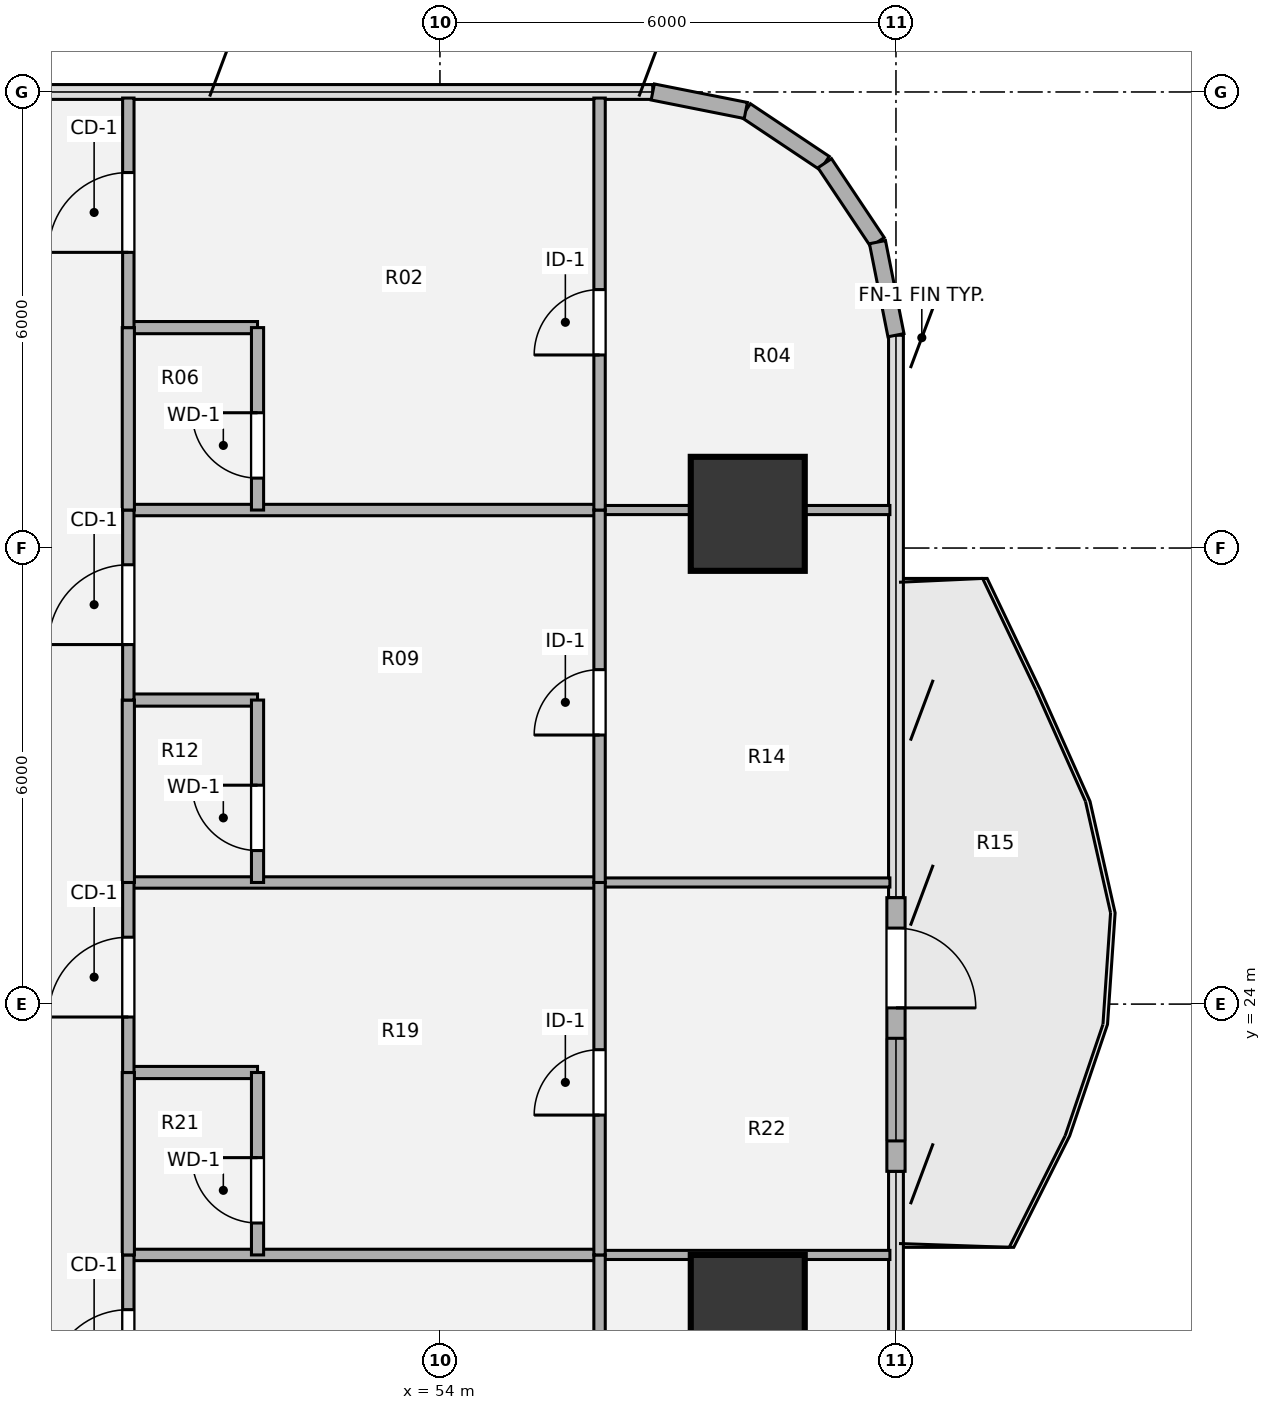
"""IFC4 building model, lengths in metres.
Left out: names, types, materials, properties, quantities, classifications, styles, units other than length and angle.
Written with IfcOpenShell. Run it as: python <this file> out.ifc"""

import sys

from ifc_helpers import new_model, si_unit, direction, frame, frame_2d, origin, origin_2d, place, context, subcontext, project, spatial, rectangle, hollow_circle, extrude, source, transform, mapped, element, fill, save


model = new_model("IFC4")
c1 = context("Model", 3, precision=1e-05, world=origin(), true_north=direction((0.0, 1.0)))
c2 = subcontext(c1, "Body", "Model", "MODEL_VIEW")
j1 = project(units=[si_unit("LENGTHUNIT", "METRE"), si_unit("PLANEANGLEUNIT", "RADIAN")], contexts=[c1])
p1 = place(None, origin())
s1 = spatial("IfcSite", under=j1, at=p1, CompositionType="ELEMENT")
p2 = place(p1, origin())
s2 = spatial("IfcBuilding", under=s1, at=p2, CompositionType="ELEMENT")
p3 = place(p2, frame((0.0, 0.0, 64.8)))
s3 = spatial("IfcBuildingStorey", under=s2, at=p3, CompositionType="ELEMENT", Elevation=64.8)
m1 = source(origin(), c2, "Body", "SweptSolid", [
    extrude(hollow_circle(Radius=0.75, WallThickness=0.05, at=origin_2d()), origin(), (0.0, 0.0, 1.0), 3.78),
])
for number, where, z_axis, x_axis in (
    (1, (58.05, 19.95, 0.0), (0.0, 0.0, 1.0), (1.0, 0.0, 0.0)),
    (2, (58.05, 30.45, 0.0), (0.0, 0.0, 1.0), (1.0, 0.0, 0.0)),
):
    element("IfcColumn", number, at=place(p3, frame(where, z_axis=z_axis, x_axis=x_axis)), inside=s3, PredefinedType="COLUMN", context=c2, shape_type="MappedRepresentation", body=[
        mapped(m1, transform((0.0, 0.0, 0.0), x_axis=(1.0, 0.0, 0.0), y_axis=(0.0, 1.0, 0.0), z_axis=(0.0, 0.0, 1.0), scale=1.0)),
    ])
for number, where, z_axis, x_axis in (
    (3, (58.025, 35.756, 0.0), (0.0, 0.0, 1.0), (0.831, -0.556, 0.0)),
    (4, (59.063, 35.063, 0.0), (0.0, 0.0, 1.0), (0.556, -0.831, 0.0)),
    (5, (59.756, 34.025, 0.0), (0.0, 0.0, 1.0), (0.195, -0.981, 0.0)),
):
    element("IfcWall", number, at=place(p3, frame(where, z_axis=z_axis, x_axis=x_axis)), inside=s3, PredefinedType="SOLIDWALL", context=c2, shape_type="SweptSolid", body=[
        extrude(rectangle(XDim=1.249, YDim=0.215, at=frame_2d((0.624, 0.0))), origin(), (0.0, 0.0, 1.0), 3.53),
    ])
p4 = place(p3, frame((60.0, 25.4, 0.0), z_axis=(0.0, 0.0, 1.0), x_axis=(0.0, -1.0, 0.0)))
e6 = element("IfcWall", 6, at=p4, inside=s3, PredefinedType="SOLIDWALL", context=c2, shape_type="SweptSolid", body=[
    extrude(rectangle(XDim=3.6, YDim=0.24, at=frame_2d((1.8, 0.0))), origin(), (0.0, 0.0, 1.0), 3.53),
])
p5 = place(p4, frame((0.4, 0.0, 0.0)))
e7 = element("IfcOpeningElement", 7, at=p5, cuts=e6, PredefinedType="OPENING", context=c2, shape_type="SweptSolid", body=[
    extrude(rectangle(XDim=1.05, YDim=2.15, at=origin_2d()), frame((0.525, 0.13, 1.075), z_axis=(0.0, -1.0, 0.0), x_axis=(1.0, 0.0, 0.0)), (0.0, 0.0, 1.0), 0.26),
])
p6 = place(p4, frame((1.85, 0.0, 0.85)))
e8 = element("IfcOpeningElement", 8, at=p6, cuts=e6, PredefinedType="OPENING", context=c2, shape_type="SweptSolid", body=[
    extrude(rectangle(XDim=1.35, YDim=1.35, at=origin_2d()), frame((0.675, 0.13, 0.675), z_axis=(0.0, -1.0, 0.0), x_axis=(1.0, 0.0, 0.0)), (0.0, 0.0, 1.0), 0.26),
])
p7 = place(p3, frame((56.8, 36.0, 0.0), z_axis=(0.0, 0.0, 1.0), x_axis=(0.980775717779, -0.195138390419, 0.0)))
e9 = element("IfcWall", 9, at=p7, inside=s3, PredefinedType="SOLIDWALL", context=c2, shape_type="SweptSolid", body=[
    extrude(rectangle(XDim=1.249, YDim=0.215, at=frame_2d((0.624, 0.0))), origin(), (0.0, 0.0, 1.0), 3.53),
])
p8 = place(p3, frame((49.9, 20.7, 0.0), z_axis=(0.0, 0.0, 1.0), x_axis=(1.0, 0.0, 0.0)))
e10 = element("IfcWall", 10, at=p8, inside=s3, PredefinedType="PARTITIONING", context=c2, shape_type="SweptSolid", body=[
    extrude(rectangle(XDim=6.2, YDim=0.15, at=frame_2d((3.1, 0.0))), origin(), (0.0, 0.0, 1.0), 2.982),
])
p9 = place(p3, frame((56.1, 20.7, 0.0), z_axis=(0.0, 0.0, 1.0), x_axis=(1.0, 0.0, 0.0)))
e11 = element("IfcWall", 11, at=p9, inside=s3, PredefinedType="PARTITIONING", context=c2, shape_type="SweptSolid", body=[
    extrude(rectangle(XDim=3.82, YDim=0.12, at=frame_2d((1.91, 0.0))), origin(), (0.0, 0.0, 1.0), 2.982),
])
p10 = place(p3, frame((49.9, 23.1, 0.0), z_axis=(0.0, 0.0, 1.0), x_axis=(1.0, 0.0, 0.0)))
e12 = element("IfcWall", 12, at=p10, inside=s3, PredefinedType="PLUMBINGWALL", context=c2, shape_type="SweptSolid", body=[
    extrude(rectangle(XDim=1.7, YDim=0.16, at=frame_2d((0.85, 0.0))), origin(), (0.0, 0.0, 1.0), 3.055),
])
p11 = place(p3, frame((49.9, 25.6, 0.0), z_axis=(0.0, 0.0, 1.0), x_axis=(1.0, 0.0, 0.0)))
e13 = element("IfcWall", 13, at=p11, inside=s3, PredefinedType="PARTITIONING", context=c2, shape_type="SweptSolid", body=[
    extrude(rectangle(XDim=6.2, YDim=0.15, at=frame_2d((3.1, 0.0))), origin(), (0.0, 0.0, 1.0), 2.982),
])
p12 = place(p3, frame((56.1, 25.6, 0.0), z_axis=(0.0, 0.0, 1.0), x_axis=(1.0, 0.0, 0.0)))
e14 = element("IfcWall", 14, at=p12, inside=s3, PredefinedType="PARTITIONING", context=c2, shape_type="SweptSolid", body=[
    extrude(rectangle(XDim=3.82, YDim=0.12, at=frame_2d((1.91, 0.0))), origin(), (0.0, 0.0, 1.0), 2.982),
])
p13 = place(p3, frame((49.9, 28.0, 0.0), z_axis=(0.0, 0.0, 1.0), x_axis=(1.0, 0.0, 0.0)))
e15 = element("IfcWall", 15, at=p13, inside=s3, PredefinedType="PLUMBINGWALL", context=c2, shape_type="SweptSolid", body=[
    extrude(rectangle(XDim=1.7, YDim=0.16, at=frame_2d((0.85, 0.0))), origin(), (0.0, 0.0, 1.0), 2.982),
])
p14 = place(p3, frame((49.9, 30.5, 0.0), z_axis=(0.0, 0.0, 1.0), x_axis=(1.0, 0.0, 0.0)))
e16 = element("IfcWall", 16, at=p14, inside=s3, PredefinedType="PARTITIONING", context=c2, shape_type="SweptSolid", body=[
    extrude(rectangle(XDim=6.2, YDim=0.15, at=frame_2d((3.1, 0.0))), origin(), (0.0, 0.0, 1.0), 2.903),
])
p15 = place(p3, frame((56.1, 30.5, 0.0), z_axis=(0.0, 0.0, 1.0), x_axis=(1.0, 0.0, 0.0)))
e17 = element("IfcWall", 17, at=p15, inside=s3, PredefinedType="PARTITIONING", context=c2, shape_type="SweptSolid", body=[
    extrude(rectangle(XDim=3.82, YDim=0.12, at=frame_2d((1.91, 0.0))), origin(), (0.0, 0.0, 1.0), 2.903),
])
p16 = place(p3, frame((49.9, 32.9, 0.0), z_axis=(0.0, 0.0, 1.0), x_axis=(1.0, 0.0, 0.0)))
e18 = element("IfcWall", 18, at=p16, inside=s3, PredefinedType="PLUMBINGWALL", context=c2, shape_type="SweptSolid", body=[
    extrude(rectangle(XDim=1.7, YDim=0.16, at=frame_2d((0.85, 0.0))), origin(), (0.0, 0.0, 1.0), 3.055),
])
p17 = place(p3, frame((49.9, 18.2, 0.0), z_axis=(0.0, 0.0, 1.0), x_axis=(0.0, 1.0, 0.0)))
e19 = element("IfcWall", 19, at=p17, inside=s3, PredefinedType="PARTITIONING", context=c2, shape_type="SweptSolid", body=[
    extrude(rectangle(XDim=2.5, YDim=0.15, at=frame_2d((1.25, 0.0))), origin(), (0.0, 0.0, 1.0), 3.5),
])
p18 = place(p17, frame((0.73, 0.0, 0.0)))
e20 = element("IfcOpeningElement", 20, at=p18, cuts=e19, PredefinedType="OPENING", context=c2, shape_type="SweptSolid", body=[
    extrude(rectangle(XDim=1.05, YDim=2.1, at=origin_2d()), frame((0.525, 0.085, 1.05), z_axis=(0.0, -1.0, 0.0), x_axis=(1.0, 0.0, 0.0)), (0.0, 0.0, 1.0), 0.17),
])
p19 = place(p3, frame((49.9, 20.7, 0.0), z_axis=(0.0, 0.0, 1.0), x_axis=(0.0, 1.0, 0.0)))
e21 = element("IfcWall", 21, at=p19, inside=s3, PredefinedType="PLUMBINGWALL", context=c2, shape_type="SweptSolid", body=[
    extrude(rectangle(XDim=2.4, YDim=0.16, at=frame_2d((1.2, 0.0))), origin(), (0.0, 0.0, 1.0), 3.5),
])
p20 = place(p3, frame((49.9, 23.1, 0.0), z_axis=(0.0, 0.0, 1.0), x_axis=(0.0, 1.0, 0.0)))
e22 = element("IfcWall", 22, at=p20, inside=s3, PredefinedType="PARTITIONING", context=c2, shape_type="SweptSolid", body=[
    extrude(rectangle(XDim=2.5, YDim=0.15, at=frame_2d((1.25, 0.0))), origin(), (0.0, 0.0, 1.0), 3.5),
])
p21 = place(p20, frame((0.73, 0.0, 0.0)))
e23 = element("IfcOpeningElement", 23, at=p21, cuts=e22, PredefinedType="OPENING", context=c2, shape_type="SweptSolid", body=[
    extrude(rectangle(XDim=1.05, YDim=2.1, at=origin_2d()), frame((0.525, 0.085, 1.05), z_axis=(0.0, -1.0, 0.0), x_axis=(1.0, 0.0, 0.0)), (0.0, 0.0, 1.0), 0.17),
])
p22 = place(p3, frame((49.9, 25.6, 0.0), z_axis=(0.0, 0.0, 1.0), x_axis=(0.0, 1.0, 0.0)))
e24 = element("IfcWall", 24, at=p22, inside=s3, PredefinedType="PLUMBINGWALL", context=c2, shape_type="SweptSolid", body=[
    extrude(rectangle(XDim=2.4, YDim=0.16, at=frame_2d((1.2, 0.0))), origin(), (0.0, 0.0, 1.0), 3.5),
])
p23 = place(p3, frame((49.9, 28.0, 0.0), z_axis=(0.0, 0.0, 1.0), x_axis=(0.0, 1.0, 0.0)))
e25 = element("IfcWall", 25, at=p23, inside=s3, PredefinedType="PARTITIONING", context=c2, shape_type="SweptSolid", body=[
    extrude(rectangle(XDim=2.5, YDim=0.15, at=frame_2d((1.25, 0.0))), origin(), (0.0, 0.0, 1.0), 3.5),
])
p24 = place(p23, frame((0.73, 0.0, 0.0)))
e26 = element("IfcOpeningElement", 26, at=p24, cuts=e25, PredefinedType="OPENING", context=c2, shape_type="SweptSolid", body=[
    extrude(rectangle(XDim=1.05, YDim=2.1, at=origin_2d()), frame((0.525, 0.085, 1.05), z_axis=(0.0, -1.0, 0.0), x_axis=(1.0, 0.0, 0.0)), (0.0, 0.0, 1.0), 0.17),
])
p25 = place(p3, frame((49.9, 30.5, 0.0), z_axis=(0.0, 0.0, 1.0), x_axis=(0.0, 1.0, 0.0)))
e27 = element("IfcWall", 27, at=p25, inside=s3, PredefinedType="PLUMBINGWALL", context=c2, shape_type="SweptSolid", body=[
    extrude(rectangle(XDim=2.4, YDim=0.16, at=frame_2d((1.2, 0.0))), origin(), (0.0, 0.0, 1.0), 3.5),
])
p26 = place(p3, frame((49.9, 32.9, 0.0), z_axis=(0.0, 0.0, 1.0), x_axis=(0.0, 1.0, 0.0)))
e28 = element("IfcWall", 28, at=p26, inside=s3, PredefinedType="PARTITIONING", context=c2, shape_type="SweptSolid", body=[
    extrude(rectangle(XDim=3.02, YDim=0.15, at=frame_2d((1.51, 0.0))), origin(), (0.0, 0.0, 1.0), 3.5),
])
p27 = place(p26, frame((0.99, 0.0, 0.0)))
e29 = element("IfcOpeningElement", 29, at=p27, cuts=e28, PredefinedType="OPENING", context=c2, shape_type="SweptSolid", body=[
    extrude(rectangle(XDim=1.05, YDim=2.1, at=origin_2d()), frame((0.525, 0.085, 1.05), z_axis=(0.0, -1.0, 0.0), x_axis=(1.0, 0.0, 0.0)), (0.0, 0.0, 1.0), 0.17),
])
p28 = place(p3, frame((51.6, 20.7, 0.0), z_axis=(0.0, 0.0, 1.0), x_axis=(0.0, 1.0, 0.0)))
e30 = element("IfcWall", 30, at=p28, inside=s3, PredefinedType="PLUMBINGWALL", context=c2, shape_type="SweptSolid", body=[
    extrude(rectangle(XDim=2.4, YDim=0.16, at=frame_2d((1.2, 0.0))), origin(), (0.0, 0.0, 1.0), 3.5),
])
p29 = place(p28, frame((0.42, 0.0, 0.0)))
e31 = element("IfcOpeningElement", 31, at=p29, cuts=e30, PredefinedType="OPENING", context=c2, shape_type="SweptSolid", body=[
    extrude(rectangle(XDim=0.86, YDim=2.1, at=origin_2d()), frame((0.43, 0.09, 1.05), z_axis=(0.0, -1.0, 0.0), x_axis=(1.0, 0.0, 0.0)), (0.0, 0.0, 1.0), 0.18),
])
p30 = place(p3, frame((51.6, 25.6, 0.0), z_axis=(0.0, 0.0, 1.0), x_axis=(0.0, 1.0, 0.0)))
e32 = element("IfcWall", 32, at=p30, inside=s3, PredefinedType="PLUMBINGWALL", context=c2, shape_type="SweptSolid", body=[
    extrude(rectangle(XDim=2.4, YDim=0.16, at=frame_2d((1.2, 0.0))), origin(), (0.0, 0.0, 1.0), 3.5),
])
p31 = place(p30, frame((0.42, 0.0, 0.0)))
e33 = element("IfcOpeningElement", 33, at=p31, cuts=e32, PredefinedType="OPENING", context=c2, shape_type="SweptSolid", body=[
    extrude(rectangle(XDim=0.86, YDim=2.1, at=origin_2d()), frame((0.43, 0.09, 1.05), z_axis=(0.0, -1.0, 0.0), x_axis=(1.0, 0.0, 0.0)), (0.0, 0.0, 1.0), 0.18),
])
p32 = place(p3, frame((51.6, 30.5, 0.0), z_axis=(0.0, 0.0, 1.0), x_axis=(0.0, 1.0, 0.0)))
e34 = element("IfcWall", 34, at=p32, inside=s3, PredefinedType="PLUMBINGWALL", context=c2, shape_type="SweptSolid", body=[
    extrude(rectangle(XDim=2.4, YDim=0.16, at=frame_2d((1.2, 0.0))), origin(), (0.0, 0.0, 1.0), 3.5),
])
p33 = place(p32, frame((0.42, 0.0, 0.0)))
e35 = element("IfcOpeningElement", 35, at=p33, cuts=e34, PredefinedType="OPENING", context=c2, shape_type="SweptSolid", body=[
    extrude(rectangle(XDim=0.86, YDim=2.1, at=origin_2d()), frame((0.43, 0.09, 1.05), z_axis=(0.0, -1.0, 0.0), x_axis=(1.0, 0.0, 0.0)), (0.0, 0.0, 1.0), 0.18),
])
p34 = place(p3, frame((56.1, 15.8, 0.0), z_axis=(0.0, 0.0, 1.0), x_axis=(0.0, 1.0, 0.0)))
e36 = element("IfcWall", 36, at=p34, inside=s3, PredefinedType="PARTITIONING", context=c2, shape_type="SweptSolid", body=[
    extrude(rectangle(XDim=4.9, YDim=0.15, at=frame_2d((2.45, 0.0))), origin(), (0.0, 0.0, 1.0), 3.5),
])
p35 = place(p34, frame((1.74, 0.0, 0.0)))
e37 = element("IfcOpeningElement", 37, at=p35, cuts=e36, PredefinedType="OPENING", context=c2, shape_type="SweptSolid", body=[
    extrude(rectangle(XDim=0.86, YDim=2.1, at=origin_2d()), frame((0.43, 0.085, 1.05), z_axis=(0.0, -1.0, 0.0), x_axis=(1.0, 0.0, 0.0)), (0.0, 0.0, 1.0), 0.17),
])
p36 = place(p3, frame((56.1, 20.7, 0.0), z_axis=(0.0, 0.0, 1.0), x_axis=(0.0, 1.0, 0.0)))
e38 = element("IfcWall", 38, at=p36, inside=s3, PredefinedType="PARTITIONING", context=c2, shape_type="SweptSolid", body=[
    extrude(rectangle(XDim=4.9, YDim=0.15, at=frame_2d((2.45, 0.0))), origin(), (0.0, 0.0, 1.0), 3.5),
])
p37 = place(p36, frame((1.84, 0.0, 0.0)))
e39 = element("IfcOpeningElement", 39, at=p37, cuts=e38, PredefinedType="OPENING", context=c2, shape_type="SweptSolid", body=[
    extrude(rectangle(XDim=0.86, YDim=2.1, at=origin_2d()), frame((0.43, 0.085, 1.05), z_axis=(0.0, -1.0, 0.0), x_axis=(1.0, 0.0, 0.0)), (0.0, 0.0, 1.0), 0.17),
])
p38 = place(p3, frame((56.1, 25.6, 0.0), z_axis=(0.0, 0.0, 1.0), x_axis=(0.0, 1.0, 0.0)))
e40 = element("IfcWall", 40, at=p38, inside=s3, PredefinedType="PARTITIONING", context=c2, shape_type="SweptSolid", body=[
    extrude(rectangle(XDim=4.9, YDim=0.15, at=frame_2d((2.45, 0.0))), origin(), (0.0, 0.0, 1.0), 3.5),
])
p39 = place(p38, frame((1.94, 0.0, 0.0)))
e41 = element("IfcOpeningElement", 41, at=p39, cuts=e40, PredefinedType="OPENING", context=c2, shape_type="SweptSolid", body=[
    extrude(rectangle(XDim=0.86, YDim=2.1, at=origin_2d()), frame((0.43, 0.085, 1.05), z_axis=(0.0, -1.0, 0.0), x_axis=(1.0, 0.0, 0.0)), (0.0, 0.0, 1.0), 0.17),
])
p40 = place(p3, frame((56.1, 30.5, 0.0), z_axis=(0.0, 0.0, 1.0), x_axis=(0.0, 1.0, 0.0)))
e42 = element("IfcWall", 42, at=p40, inside=s3, PredefinedType="PARTITIONING", context=c2, shape_type="SweptSolid", body=[
    extrude(rectangle(XDim=5.42, YDim=0.15, at=frame_2d((2.71, 0.0))), origin(), (0.0, 0.0, 1.0), 3.5),
])
p41 = place(p40, frame((2.04, 0.0, 0.0)))
e43 = element("IfcOpeningElement", 43, at=p41, cuts=e42, PredefinedType="OPENING", context=c2, shape_type="SweptSolid", body=[
    extrude(rectangle(XDim=0.86, YDim=2.1, at=origin_2d()), frame((0.43, 0.085, 1.05), z_axis=(0.0, -1.0, 0.0), x_axis=(1.0, 0.0, 0.0)), (0.0, 0.0, 1.0), 0.17),
])
m2 = source(origin(), c2, "Body", "SweptSolid", [
    extrude(rectangle(XDim=1.05, YDim=2.15, at=origin_2d()), frame((0.525, 0.025, 1.075), z_axis=(0.0, -1.0, 0.0), x_axis=(1.0, 0.0, 0.0)), (0.0, 0.0, 1.0), 0.05),
])
p42 = place(p5, origin())
e44 = element("IfcDoor", 44, at=p42, inside=s3, OperationType="SINGLE_SWING_RIGHT", PredefinedType="DOOR", context=c2, shape_type="MappedRepresentation", body=[
    mapped(m2, transform((0.0, 0.0, 0.0), x_axis=(1.0, 0.0, 0.0), y_axis=(0.0, 1.0, 0.0), z_axis=(0.0, 0.0, 1.0), scale=1.0)),
])
fill(e7, e44)
m3 = source(origin(), c2, "Body", "SweptSolid", [
    extrude(rectangle(XDim=1.35, YDim=1.35, at=origin_2d()), frame((0.675, 0.03, 0.675), z_axis=(0.0, -1.0, 0.0), x_axis=(1.0, 0.0, 0.0)), (0.0, 0.0, 1.0), 0.06),
])
p43 = place(p6, origin())
e45 = element("IfcWindow", 45, at=p43, inside=s3, PartitioningType="SINGLE_PANEL", PredefinedType="WINDOW", context=c2, shape_type="MappedRepresentation", body=[
    mapped(m3, transform((0.0, 0.0, 0.0), x_axis=(1.0, 0.0, 0.0), y_axis=(0.0, 1.0, 0.0), z_axis=(0.0, 0.0, 1.0), scale=1.0)),
])
fill(e8, e45)
m4 = source(origin(), c2, "Body", "SweptSolid", [
    extrude(rectangle(XDim=1.05, YDim=2.1, at=origin_2d()), frame((0.525, 0.025, 1.05), z_axis=(0.0, -1.0, 0.0), x_axis=(1.0, 0.0, 0.0)), (0.0, 0.0, 1.0), 0.05),
])
p44 = place(p18, origin())
e46 = element("IfcDoor", 46, at=p44, inside=s3, OperationType="SINGLE_SWING_LEFT", PredefinedType="DOOR", context=c2, shape_type="MappedRepresentation", body=[
    mapped(m4, transform((0.0, 0.0, 0.0), x_axis=(1.0, 0.0, 0.0), y_axis=(0.0, 1.0, 0.0), z_axis=(0.0, 0.0, 1.0), scale=1.0)),
])
fill(e20, e46)
p45 = place(p21, origin())
e47 = element("IfcDoor", 47, at=p45, inside=s3, OperationType="SINGLE_SWING_LEFT", PredefinedType="DOOR", context=c2, shape_type="MappedRepresentation", body=[
    mapped(m4, transform((0.0, 0.0, 0.0), x_axis=(1.0, 0.0, 0.0), y_axis=(0.0, 1.0, 0.0), z_axis=(0.0, 0.0, 1.0), scale=1.0)),
])
fill(e23, e47)
p46 = place(p24, origin())
e48 = element("IfcDoor", 48, at=p46, inside=s3, OperationType="SINGLE_SWING_LEFT", PredefinedType="DOOR", context=c2, shape_type="MappedRepresentation", body=[
    mapped(m4, transform((0.0, 0.0, 0.0), x_axis=(1.0, 0.0, 0.0), y_axis=(0.0, 1.0, 0.0), z_axis=(0.0, 0.0, 1.0), scale=1.0)),
])
fill(e26, e48)
p47 = place(p27, origin())
e49 = element("IfcDoor", 49, at=p47, inside=s3, OperationType="SINGLE_SWING_LEFT", PredefinedType="DOOR", context=c2, shape_type="MappedRepresentation", body=[
    mapped(m4, transform((0.0, 0.0, 0.0), x_axis=(1.0, 0.0, 0.0), y_axis=(0.0, 1.0, 0.0), z_axis=(0.0, 0.0, 1.0), scale=1.0)),
])
fill(e29, e49)
m5 = source(origin(), c2, "Body", "SweptSolid", [
    extrude(rectangle(XDim=0.86, YDim=2.1, at=origin_2d()), frame((0.43, 0.025, 1.05), z_axis=(0.0, -1.0, 0.0), x_axis=(1.0, 0.0, 0.0)), (0.0, 0.0, 1.0), 0.05),
])
p48 = place(p29, origin())
e50 = element("IfcDoor", 50, at=p48, inside=s3, OperationType="SINGLE_SWING_RIGHT", PredefinedType="DOOR", context=c2, shape_type="MappedRepresentation", body=[
    mapped(m5, transform((0.0, 0.0, 0.0), x_axis=(1.0, 0.0, 0.0), y_axis=(0.0, 1.0, 0.0), z_axis=(0.0, 0.0, 1.0), scale=1.0)),
])
fill(e31, e50)
p49 = place(p31, origin())
e51 = element("IfcDoor", 51, at=p49, inside=s3, OperationType="SINGLE_SWING_RIGHT", PredefinedType="DOOR", context=c2, shape_type="MappedRepresentation", body=[
    mapped(m5, transform((0.0, 0.0, 0.0), x_axis=(1.0, 0.0, 0.0), y_axis=(0.0, 1.0, 0.0), z_axis=(0.0, 0.0, 1.0), scale=1.0)),
])
fill(e33, e51)
p50 = place(p33, origin())
e52 = element("IfcDoor", 52, at=p50, inside=s3, OperationType="SINGLE_SWING_RIGHT", PredefinedType="DOOR", context=c2, shape_type="MappedRepresentation", body=[
    mapped(m5, transform((0.0, 0.0, 0.0), x_axis=(1.0, 0.0, 0.0), y_axis=(0.0, 1.0, 0.0), z_axis=(0.0, 0.0, 1.0), scale=1.0)),
])
fill(e35, e52)
m6 = source(origin(), c2, "Body", "SweptSolid", [
    extrude(rectangle(XDim=0.86, YDim=2.1, at=origin_2d()), frame((0.43, 0.025, 1.05), z_axis=(0.0, -1.0, 0.0), x_axis=(1.0, 0.0, 0.0)), (0.0, 0.0, 1.0), 0.05),
])
p51 = place(p37, origin())
e53 = element("IfcDoor", 53, at=p51, inside=s3, OperationType="SINGLE_SWING_LEFT", PredefinedType="DOOR", context=c2, shape_type="MappedRepresentation", body=[
    mapped(m6, transform((0.0, 0.0, 0.0), x_axis=(1.0, 0.0, 0.0), y_axis=(0.0, 1.0, 0.0), z_axis=(0.0, 0.0, 1.0), scale=1.0)),
])
fill(e39, e53)
p52 = place(p39, origin())
e54 = element("IfcDoor", 54, at=p52, inside=s3, OperationType="SINGLE_SWING_LEFT", PredefinedType="DOOR", context=c2, shape_type="MappedRepresentation", body=[
    mapped(m6, transform((0.0, 0.0, 0.0), x_axis=(1.0, 0.0, 0.0), y_axis=(0.0, 1.0, 0.0), z_axis=(0.0, 0.0, 1.0), scale=1.0)),
])
fill(e41, e54)
p53 = place(p41, origin())
e55 = element("IfcDoor", 55, at=p53, inside=s3, OperationType="SINGLE_SWING_LEFT", PredefinedType="DOOR", context=c2, shape_type="MappedRepresentation", body=[
    mapped(m6, transform((0.0, 0.0, 0.0), x_axis=(1.0, 0.0, 0.0), y_axis=(0.0, 1.0, 0.0), z_axis=(0.0, 0.0, 1.0), scale=1.0)),
])
fill(e43, e55)
save(model, sys.argv[1])
